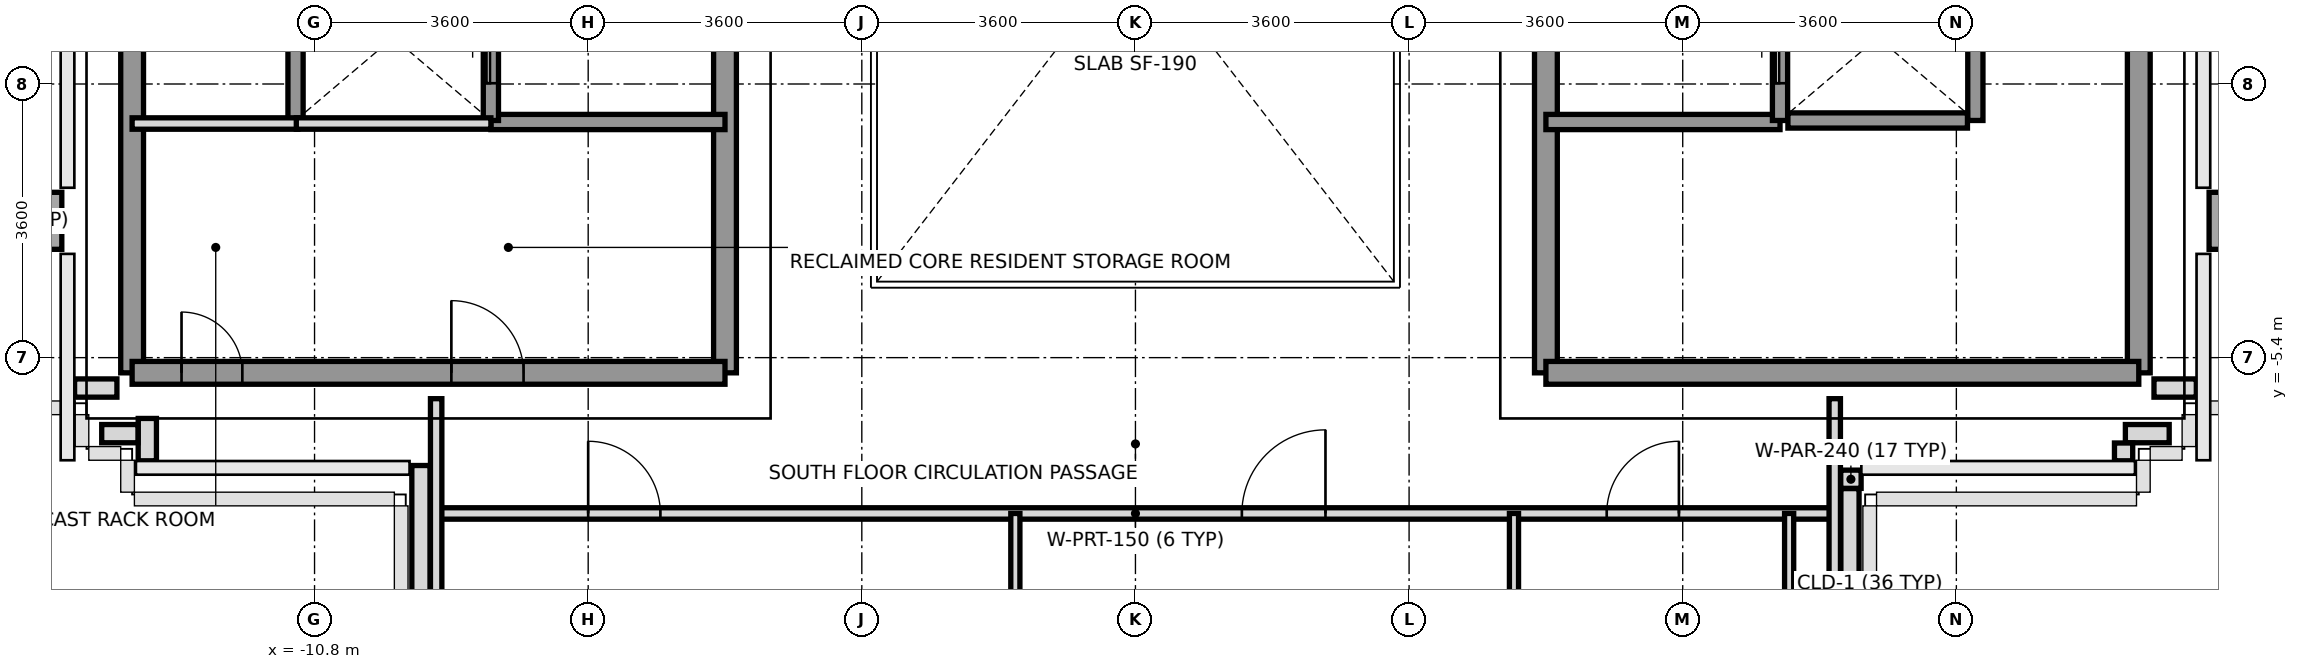
"""IFC4 building model, lengths in metres.
Left out: names, types, materials, properties, quantities, classifications, styles, units other than length and angle.
Written with IfcOpenShell. Run it as: python <this file> out.ifc"""

import sys

from ifc_helpers import new_model, si_unit, direction, frame, frame_2d, origin, origin_2d, place, context, subcontext, project, spatial, rectangle, extrude, source, transform, mapped, element, fill, save


model = new_model("IFC4")
c1 = context("Model", 3, precision=1e-05, world=origin(), true_north=direction((0.0, 1.0)))
c2 = subcontext(c1, "Body", "Model", "MODEL_VIEW")
j1 = project(units=[si_unit("LENGTHUNIT", "METRE"), si_unit("PLANEANGLEUNIT", "RADIAN")], contexts=[c1])
p1 = place(None, origin())
s1 = spatial("IfcSite", under=j1, at=p1, CompositionType="ELEMENT")
p2 = place(p1, origin())
s2 = spatial("IfcBuilding", under=s1, at=p2, CompositionType="ELEMENT")
p3 = place(p2, frame((0.0, 0.0, 268.4)))
s3 = spatial("IfcBuildingStorey", under=s2, at=p3, CompositionType="ELEMENT", Elevation=268.4)
m1 = source(origin(), c2, "Body", "SweptSolid", [
    extrude(rectangle(XDim=0.55, YDim=0.75, at=origin_2d()), origin(), (0.0, 0.0, 1.0), 2.96),
])
for number, where, z_axis, x_axis in (
    (1, (-14.4, -3.6, 0.0), (0.0, 0.0, 1.0), (1.0, 0.0, 0.0)),
    (2, (14.4, -3.6, 0.0), (0.0, 0.0, 1.0), (1.0, 0.0, 0.0)),
):
    element("IfcColumn", number, at=place(p3, frame(where, z_axis=z_axis, x_axis=x_axis)), inside=s3, PredefinedType="COLUMN", context=c2, shape_type="MappedRepresentation", body=[
        mapped(m1, transform((0.0, 0.0, 0.0), x_axis=(1.0, 0.0, 0.0), y_axis=(0.0, 1.0, 0.0), z_axis=(0.0, 0.0, 1.0), scale=1.0)),
    ])
p4 = place(p3, frame((13.957, -5.8, 0.0), z_axis=(0.0, 0.0, 1.0), x_axis=(-1.0, 0.0, 0.0)))
e3 = element("IfcWall", 3, at=p4, inside=s3, PredefinedType="PARAPET", context=c2, shape_type="SweptSolid", body=[
    extrude(rectangle(XDim=0.557, YDim=0.24, at=frame_2d((0.279, 0.0))), origin(), (0.0, 0.0, 1.0), 1.15),
])
p5 = place(p3, frame((13.6, -6.4, 0.0), z_axis=(0.0, 0.0, 1.0), x_axis=(-1.0, 0.0, 0.0)))
e4 = element("IfcWall", 4, at=p5, inside=s3, PredefinedType="PARAPET", context=c2, shape_type="SweptSolid", body=[
    extrude(rectangle(XDim=0.576, YDim=0.24, at=frame_2d((0.288, 0.0))), origin(), (0.0, 0.0, 1.0), 1.15),
])
p6 = place(p3, frame((13.0, -6.523, 0.0), z_axis=(0.0, 0.0, 1.0), x_axis=(0.0, -1.0, 0.0)))
e5 = element("IfcWall", 5, at=p6, inside=s3, PredefinedType="PARAPET", context=c2, shape_type="SweptSolid", body=[
    extrude(rectangle(XDim=0.234, YDim=0.24, at=frame_2d((0.117, 0.0))), origin(), (0.0, 0.0, 1.0), 1.15),
])
p7 = place(p3, frame((9.547, -7.0, 0.0), z_axis=(0.0, 0.0, 1.0), x_axis=(-1.0, 0.0, 0.0)))
e6 = element("IfcWall", 6, at=p7, inside=s3, PredefinedType="PARAPET", context=c2, shape_type="SweptSolid", body=[
    extrude(rectangle(XDim=0.269, YDim=0.24, at=frame_2d((0.135, 0.0))), origin(), (0.0, 0.0, 1.0), 1.15),
])
p8 = place(p3, frame((9.4, -7.123, 0.0), z_axis=(0.0, 0.0, 1.0), x_axis=(0.0, -1.0, 0.0)))
e7 = element("IfcWall", 7, at=p8, inside=s3, PredefinedType="PARAPET", context=c2, shape_type="SweptSolid", body=[
    extrude(rectangle(XDim=1.499, YDim=0.24, at=frame_2d((0.75, 0.0))), origin(), (0.0, 0.0, 1.0), 1.15),
])
p9 = place(p3, frame((-9.4, -8.622, 0.0), z_axis=(0.0, 0.0, 1.0), x_axis=(0.0, 1.0, 0.0)))
e8 = element("IfcWall", 8, at=p9, inside=s3, PredefinedType="PARAPET", context=c2, shape_type="SweptSolid", body=[
    extrude(rectangle(XDim=1.803, YDim=0.24, at=frame_2d((0.901, 0.0))), origin(), (0.0, 0.0, 1.0), 1.15),
])
p10 = place(p3, frame((-13.0, -6.757, 0.0), z_axis=(0.0, 0.0, 1.0), x_axis=(0.0, 1.0, 0.0)))
e9 = element("IfcWall", 9, at=p10, inside=s3, PredefinedType="PARAPET", context=c2, shape_type="SweptSolid", body=[
    extrude(rectangle(XDim=0.557, YDim=0.24, at=frame_2d((0.279, 0.0))), origin(), (0.0, 0.0, 1.0), 1.15),
])
p11 = place(p3, frame((-13.123, -6.4, 0.0), z_axis=(0.0, 0.0, 1.0), x_axis=(-1.0, 0.0, 0.0)))
e10 = element("IfcWall", 10, at=p11, inside=s3, PredefinedType="PARAPET", context=c2, shape_type="SweptSolid", body=[
    extrude(rectangle(XDim=0.477, YDim=0.24, at=frame_2d((0.239, 0.0))), origin(), (0.0, 0.0, 1.0), 1.15),
])
p12 = place(p3, frame((-13.4, -5.8, 0.0), z_axis=(0.0, 0.0, 1.0), x_axis=(-1.0, 0.0, 0.0)))
e11 = element("IfcWall", 11, at=p12, inside=s3, PredefinedType="PARAPET", context=c2, shape_type="SweptSolid", body=[
    extrude(rectangle(XDim=0.557, YDim=0.24, at=frame_2d((0.279, 0.0))), origin(), (0.0, 0.0, 1.0), 1.15),
])
p13 = place(p3, frame((-13.2, -5.6, 0.0), z_axis=(0.0, 0.0, 1.0), x_axis=(0.0, 1.0, 0.0)))
e12 = element("IfcWall", 12, at=p13, inside=s3, PredefinedType="SHEAR", context=c2, shape_type="SweptSolid", body=[
    extrude(rectangle(XDim=11.2, YDim=0.3, at=frame_2d((5.6, 0.0))), origin(), (0.0, 0.0, 1.0), 2.96),
])
p14 = place(p3, frame((-5.4, -5.6, 0.0), z_axis=(0.0, 0.0, 1.0), x_axis=(0.0, 1.0, 0.0)))
e13 = element("IfcWall", 13, at=p14, inside=s3, PredefinedType="SHEAR", context=c2, shape_type="SweptSolid", body=[
    extrude(rectangle(XDim=12.5, YDim=0.3, at=frame_2d((6.25, 0.0))), origin(), (0.0, 0.0, 1.0), 2.96),
])
p15 = place(p14, frame((4.55, 0.0, 0.0)))
e14 = element("IfcOpeningElement", 14, at=p15, cuts=e13, PredefinedType="OPENING", context=c2, shape_type="SweptSolid", body=[
    extrude(rectangle(XDim=1.2, YDim=2.2, at=frame_2d((0.6, 1.1))), frame((0.0, 0.16, 0.0), z_axis=(0.0, -1.0, 0.0), x_axis=(1.0, 0.0, 0.0)), (0.0, 0.0, 1.0), 0.32),
])
p16 = place(p14, frame((10.45, 0.0, 0.0)))
e15 = element("IfcOpeningElement", 15, at=p16, cuts=e13, PredefinedType="OPENING", context=c2, shape_type="SweptSolid", body=[
    extrude(rectangle(XDim=1.2, YDim=2.2, at=frame_2d((0.6, 1.1))), frame((0.0, 0.16, 0.0), z_axis=(0.0, -1.0, 0.0), x_axis=(1.0, 0.0, 0.0)), (0.0, 0.0, 1.0), 0.32),
])
p17 = place(p14, frame((6.86, 0.0, 0.0)))
e16 = element("IfcOpeningElement", 16, at=p17, cuts=e13, PredefinedType="OPENING", context=c2, shape_type="SweptSolid", body=[
    extrude(rectangle(XDim=0.8, YDim=2.1, at=frame_2d((0.4, 1.05))), frame((0.0, 0.16, 0.0), z_axis=(0.0, -1.0, 0.0), x_axis=(1.0, 0.0, 0.0)), (0.0, 0.0, 1.0), 0.32),
])
p18 = place(p3, frame((-13.2, -5.6, 0.0), z_axis=(0.0, 0.0, 1.0), x_axis=(1.0, 0.0, 0.0)))
e17 = element("IfcWall", 17, at=p18, inside=s3, PredefinedType="SHEAR", context=c2, shape_type="SweptSolid", body=[
    extrude(rectangle(XDim=7.8, YDim=0.3, at=frame_2d((3.9, 0.0))), origin(), (0.0, 0.0, 1.0), 2.96),
])
p19 = place(p18, frame((0.65, 0.0, 0.0)))
e18 = element("IfcOpeningElement", 18, at=p19, cuts=e17, PredefinedType="OPENING", context=c2, shape_type="SweptSolid", body=[
    extrude(rectangle(XDim=0.8, YDim=2.1, at=frame_2d((0.4, 1.05))), frame((0.0, 0.16, 0.0), z_axis=(0.0, -1.0, 0.0), x_axis=(1.0, 0.0, 0.0)), (0.0, 0.0, 1.0), 0.32),
])
p20 = place(p18, frame((4.2, 0.0, 0.0)))
e19 = element("IfcOpeningElement", 19, at=p20, cuts=e17, PredefinedType="OPENING", context=c2, shape_type="SweptSolid", body=[
    extrude(rectangle(XDim=0.95, YDim=2.15, at=frame_2d((0.475, 1.075))), frame((0.0, 0.16, 0.0), z_axis=(0.0, -1.0, 0.0), x_axis=(1.0, 0.0, 0.0)), (0.0, 0.0, 1.0), 0.32),
])
p21 = place(p3, frame((-8.48, -2.3, 0.0), z_axis=(0.0, 0.0, 1.0), x_axis=(1.0, 0.0, 0.0)))
e20 = element("IfcWall", 20, at=p21, inside=s3, PredefinedType="SOLIDWALL", context=c2, shape_type="SweptSolid", body=[
    extrude(rectangle(XDim=3.08, YDim=0.2, at=frame_2d((1.54, 0.0))), origin(), (0.0, 0.0, 1.0), 2.96),
])
p22 = place(p3, frame((13.2, -5.6, 0.0), z_axis=(0.0, 0.0, 1.0), x_axis=(0.0, 1.0, 0.0)))
e21 = element("IfcWall", 21, at=p22, inside=s3, PredefinedType="SHEAR", context=c2, shape_type="SweptSolid", body=[
    extrude(rectangle(XDim=11.2, YDim=0.3, at=frame_2d((5.6, 0.0))), origin(), (0.0, 0.0, 1.0), 2.96),
])
p23 = place(p3, frame((5.4, -5.6, 0.0), z_axis=(0.0, 0.0, 1.0), x_axis=(0.0, 1.0, 0.0)))
e22 = element("IfcWall", 22, at=p23, inside=s3, PredefinedType="SHEAR", context=c2, shape_type="SweptSolid", body=[
    extrude(rectangle(XDim=12.5, YDim=0.3, at=frame_2d((6.25, 0.0))), origin(), (0.0, 0.0, 1.0), 2.96),
])
p24 = place(p23, frame((4.55, 0.0, 0.0)))
e23 = element("IfcOpeningElement", 23, at=p24, cuts=e22, PredefinedType="OPENING", context=c2, shape_type="SweptSolid", body=[
    extrude(rectangle(XDim=1.2, YDim=2.2, at=frame_2d((0.6, 1.1))), frame((0.0, 0.16, 0.0), z_axis=(0.0, -1.0, 0.0), x_axis=(1.0, 0.0, 0.0)), (0.0, 0.0, 1.0), 0.32),
])
p25 = place(p23, frame((10.45, 0.0, 0.0)))
e24 = element("IfcOpeningElement", 24, at=p25, cuts=e22, PredefinedType="OPENING", context=c2, shape_type="SweptSolid", body=[
    extrude(rectangle(XDim=1.2, YDim=2.2, at=frame_2d((0.6, 1.1))), frame((0.0, 0.16, 0.0), z_axis=(0.0, -1.0, 0.0), x_axis=(1.0, 0.0, 0.0)), (0.0, 0.0, 1.0), 0.32),
])
p26 = place(p23, frame((6.86, 0.0, 0.0)))
e25 = element("IfcOpeningElement", 25, at=p26, cuts=e22, PredefinedType="OPENING", context=c2, shape_type="SweptSolid", body=[
    extrude(rectangle(XDim=0.8, YDim=2.1, at=frame_2d((0.4, 1.05))), frame((0.0, 0.16, 0.0), z_axis=(0.0, -1.0, 0.0), x_axis=(1.0, 0.0, 0.0)), (0.0, 0.0, 1.0), 0.32),
])
p27 = place(p3, frame((5.4, -5.6, 0.0), z_axis=(0.0, 0.0, 1.0), x_axis=(1.0, 0.0, 0.0)))
e26 = element("IfcWall", 26, at=p27, inside=s3, PredefinedType="SHEAR", context=c2, shape_type="SweptSolid", body=[
    extrude(rectangle(XDim=7.8, YDim=0.3, at=frame_2d((3.9, 0.0))), origin(), (0.0, 0.0, 1.0), 2.96),
])
p28 = place(p3, frame((5.4, -2.3, 0.0), z_axis=(0.0, 0.0, 1.0), x_axis=(1.0, 0.0, 0.0)))
e27 = element("IfcWall", 27, at=p28, inside=s3, PredefinedType="SOLIDWALL", context=c2, shape_type="SweptSolid", body=[
    extrude(rectangle(XDim=3.08, YDim=0.2, at=frame_2d((1.54, 0.0))), origin(), (0.0, 0.0, 1.0), 2.96),
])
p29 = place(p3, frame((-11.05, -2.28, 0.0), z_axis=(0.0, 0.0, 1.0), x_axis=(0.0, 1.0, 0.0)))
e28 = element("IfcWall", 28, at=p29, inside=s3, PredefinedType="SOLIDWALL", context=c2, shape_type="SweptSolid", body=[
    extrude(rectangle(XDim=2.18, YDim=0.2, at=frame_2d((1.09, 0.0))), origin(), (0.0, 0.0, 1.0), 2.96),
])
p30 = place(p3, frame((-8.48, -2.28, 0.0), z_axis=(0.0, 0.0, 1.0), x_axis=(0.0, 1.0, 0.0)))
e29 = element("IfcWall", 29, at=p30, inside=s3, PredefinedType="SOLIDWALL", context=c2, shape_type="SweptSolid", body=[
    extrude(rectangle(XDim=2.18, YDim=0.2, at=frame_2d((1.09, 0.0))), origin(), (0.0, 0.0, 1.0), 2.96),
])
p31 = place(p30, frame((0.49, 0.0, 0.0)))
e30 = element("IfcOpeningElement", 30, at=p31, cuts=e29, PredefinedType="OPENING", context=c2, shape_type="SweptSolid", body=[
    extrude(rectangle(XDim=1.2, YDim=2.2, at=frame_2d((0.6, 1.1))), frame((0.0, 0.11, 0.0), z_axis=(0.0, -1.0, 0.0), x_axis=(1.0, 0.0, 0.0)), (0.0, 0.0, 1.0), 0.22),
])
p32 = place(p3, frame((8.48, -2.28, 0.0), z_axis=(0.0, 0.0, 1.0), x_axis=(0.0, 1.0, 0.0)))
e31 = element("IfcWall", 31, at=p32, inside=s3, PredefinedType="SOLIDWALL", context=c2, shape_type="SweptSolid", body=[
    extrude(rectangle(XDim=2.18, YDim=0.2, at=frame_2d((1.09, 0.0))), origin(), (0.0, 0.0, 1.0), 2.96),
])
p33 = place(p32, frame((0.49, 0.0, 0.0)))
e32 = element("IfcOpeningElement", 32, at=p33, cuts=e31, PredefinedType="OPENING", context=c2, shape_type="SweptSolid", body=[
    extrude(rectangle(XDim=1.2, YDim=2.2, at=frame_2d((0.6, 1.1))), frame((0.0, 0.11, 0.0), z_axis=(0.0, -1.0, 0.0), x_axis=(1.0, 0.0, 0.0)), (0.0, 0.0, 1.0), 0.22),
])
p34 = place(p3, frame((11.05, -2.28, 0.0), z_axis=(0.0, 0.0, 1.0), x_axis=(0.0, 1.0, 0.0)))
e33 = element("IfcWall", 33, at=p34, inside=s3, PredefinedType="SOLIDWALL", context=c2, shape_type="SweptSolid", body=[
    extrude(rectangle(XDim=2.18, YDim=0.2, at=frame_2d((1.09, 0.0))), origin(), (0.0, 0.0, 1.0), 2.96),
])
p35 = place(p3, frame((8.584, -2.28, 0.0), z_axis=(0.0, 0.0, 1.0), x_axis=(1.0, 0.0, 0.0)))
e34 = element("IfcWall", 34, at=p35, inside=s3, PredefinedType="SOLIDWALL", context=c2, shape_type="SweptSolid", body=[
    extrude(rectangle(XDim=2.362, YDim=0.2, at=frame_2d((1.181, 0.0))), origin(), (0.0, 0.0, 1.0), 2.96),
])
p36 = place(p3, frame((-13.2, -2.32, 0.0), z_axis=(0.0, 0.0, 1.0), x_axis=(1.0, 0.0, 0.0)))
e35 = element("IfcWall", 35, at=p36, inside=s3, PredefinedType="PARTITIONING", context=c2, shape_type="SweptSolid", body=[
    extrude(rectangle(XDim=2.18, YDim=0.15, at=frame_2d((1.09, 0.0))), origin(), (0.0, 0.0, 1.0), 2.96),
])
p37 = place(p3, frame((-11.04, -2.32, 0.0), z_axis=(0.0, 0.0, 1.0), x_axis=(1.0, 0.0, 0.0)))
e36 = element("IfcWall", 36, at=p37, inside=s3, PredefinedType="PARTITIONING", context=c2, shape_type="SweptSolid", body=[
    extrude(rectangle(XDim=2.56, YDim=0.15, at=frame_2d((1.28, 0.0))), origin(), (0.0, 0.0, 1.0), 2.96),
])
p38 = place(p3, frame((-9.2, -7.45, 0.0), z_axis=(0.0, 0.0, 1.0), x_axis=(1.0, 0.0, 0.0)))
e37 = element("IfcWall", 37, at=p38, inside=s3, PredefinedType="PARTITIONING", context=c2, shape_type="SweptSolid", body=[
    extrude(rectangle(XDim=18.4, YDim=0.15, at=frame_2d((9.2, 0.0))), origin(), (0.0, 0.0, 1.0), 2.52),
])
p39 = place(p38, frame((15.4, 0.0, 0.0)))
e38 = element("IfcOpeningElement", 38, at=p39, cuts=e37, PredefinedType="OPENING", context=c2, shape_type="SweptSolid", body=[
    extrude(rectangle(XDim=0.95, YDim=2.15, at=frame_2d((0.475, 1.075))), frame((0.0, 0.085, 0.0), z_axis=(0.0, -1.0, 0.0), x_axis=(1.0, 0.0, 0.0)), (0.0, 0.0, 1.0), 0.17),
])
p40 = place(p38, frame((2.0, 0.0, 0.0)))
e39 = element("IfcOpeningElement", 39, at=p40, cuts=e37, PredefinedType="OPENING", context=c2, shape_type="SweptSolid", body=[
    extrude(rectangle(XDim=0.95, YDim=2.15, at=frame_2d((0.475, 1.075))), frame((0.0, 0.085, 0.0), z_axis=(0.0, -1.0, 0.0), x_axis=(1.0, 0.0, 0.0)), (0.0, 0.0, 1.0), 0.17),
])
p41 = place(p38, frame((10.6, 0.0, 0.0)))
e40 = element("IfcOpeningElement", 40, at=p41, cuts=e37, PredefinedType="OPENING", context=c2, shape_type="SweptSolid", body=[
    extrude(rectangle(XDim=1.1, YDim=2.2, at=frame_2d((0.55, 1.1))), frame((0.0, 0.085, 0.0), z_axis=(0.0, -1.0, 0.0), x_axis=(1.0, 0.0, 0.0)), (0.0, 0.0, 1.0), 0.17),
])
for number, where, z_axis, x_axis in (
    (41, (-9.2, -10.28, 0.0), (0.0, 0.0, 1.0), (0.0, 1.0, 0.0)),
    (42, (9.2, -10.28, 0.0), (0.0, 0.0, 1.0), (0.0, 1.0, 0.0)),
):
    element("IfcWall", number, at=place(p3, frame(where, z_axis=z_axis, x_axis=x_axis)), inside=s3, PredefinedType="PARTITIONING", context=c2, shape_type="SweptSolid", body=[
        extrude(rectangle(XDim=4.34, YDim=0.15, at=frame_2d((2.17, 0.0))), origin(), (0.0, 0.0, 1.0), 2.56),
    ])
for number, where, z_axis, x_axis in (
    (43, (4.98, -10.95, 0.0), (0.0, 0.0, 1.0), (0.0, 1.0, 0.0)),
    (44, (8.6, -10.95, 0.0), (0.0, 0.0, 1.0), (0.0, 1.0, 0.0)),
):
    element("IfcWall", number, at=place(p3, frame(where, z_axis=z_axis, x_axis=x_axis)), inside=s3, PredefinedType="PARTITIONING", context=c2, shape_type="SweptSolid", body=[
        extrude(rectangle(XDim=3.5, YDim=0.12, at=frame_2d((1.75, 0.0))), origin(), (0.0, 0.0, 1.0), 2.56),
    ])
p42 = place(p3, frame((-1.58, -19.25, 0.0), z_axis=(0.0, 0.0, 1.0), x_axis=(0.0, 1.0, 0.0)))
e45 = element("IfcWall", 45, at=p42, inside=s3, PredefinedType="PARTITIONING", context=c2, shape_type="SweptSolid", body=[
    extrude(rectangle(XDim=11.8, YDim=0.12, at=frame_2d((5.9, 0.0))), origin(), (0.0, 0.0, 1.0), 2.56),
])
m2 = source(origin(), c2, "Body", "SweptSolid", [
    extrude(rectangle(XDim=0.8, YDim=2.1, at=frame_2d((0.4, 1.05))), frame((0.0, 0.025, 0.0), z_axis=(0.0, -1.0, 0.0), x_axis=(1.0, 0.0, 0.0)), (0.0, 0.0, 1.0), 0.05),
])
p43 = place(p19, origin())
e46 = element("IfcDoor", 46, at=p43, inside=s3, OperationType="SINGLE_SWING_LEFT", PredefinedType="DOOR", context=c2, shape_type="MappedRepresentation", body=[
    mapped(m2, transform((0.0, 0.0, 0.0), x_axis=(1.0, 0.0, 0.0), y_axis=(0.0, 1.0, 0.0), z_axis=(0.0, 0.0, 1.0), scale=1.0)),
])
fill(e18, e46)
m3 = source(origin(), c2, "Body", "SweptSolid", [
    extrude(rectangle(XDim=0.95, YDim=2.15, at=frame_2d((0.475, 1.075))), frame((0.0, 0.025, 0.0), z_axis=(0.0, -1.0, 0.0), x_axis=(1.0, 0.0, 0.0)), (0.0, 0.0, 1.0), 0.05),
])
p44 = place(p20, origin())
e47 = element("IfcDoor", 47, at=p44, inside=s3, OperationType="SINGLE_SWING_LEFT", PredefinedType="DOOR", context=c2, shape_type="MappedRepresentation", body=[
    mapped(m3, transform((0.0, 0.0, 0.0), x_axis=(1.0, 0.0, 0.0), y_axis=(0.0, 1.0, 0.0), z_axis=(0.0, 0.0, 1.0), scale=1.0)),
])
fill(e19, e47)
m4 = source(origin(), c2, "Body", "SweptSolid", [
    extrude(rectangle(XDim=1.2, YDim=2.2, at=frame_2d((0.6, 1.1))), frame((0.0, 0.025, 0.0), z_axis=(0.0, -1.0, 0.0), x_axis=(1.0, 0.0, 0.0)), (0.0, 0.0, 1.0), 0.05),
])
p45 = place(p31, origin())
e48 = element("IfcDoor", 48, at=p45, inside=s3, OperationType="SLIDING_TO_RIGHT", PredefinedType="DOOR", context=c2, shape_type="MappedRepresentation", body=[
    mapped(m4, transform((0.0, 0.0, 0.0), x_axis=(1.0, 0.0, 0.0), y_axis=(0.0, 1.0, 0.0), z_axis=(0.0, 0.0, 1.0), scale=1.0)),
])
fill(e30, e48)
p46 = place(p33, origin())
e49 = element("IfcDoor", 49, at=p46, inside=s3, OperationType="SLIDING_TO_RIGHT", PredefinedType="DOOR", context=c2, shape_type="MappedRepresentation", body=[
    mapped(m4, transform((0.0, 0.0, 0.0), x_axis=(1.0, 0.0, 0.0), y_axis=(0.0, 1.0, 0.0), z_axis=(0.0, 0.0, 1.0), scale=1.0)),
])
fill(e32, e49)
p47 = place(p39, origin())
e50 = element("IfcDoor", 50, at=p47, inside=s3, OperationType="SINGLE_SWING_RIGHT", PredefinedType="DOOR", context=c2, shape_type="MappedRepresentation", body=[
    mapped(m3, transform((0.0, 0.0, 0.0), x_axis=(1.0, 0.0, 0.0), y_axis=(0.0, 1.0, 0.0), z_axis=(0.0, 0.0, 1.0), scale=1.0)),
])
fill(e38, e50)
p48 = place(p40, origin())
e51 = element("IfcDoor", 51, at=p48, inside=s3, OperationType="SINGLE_SWING_LEFT", PredefinedType="DOOR", context=c2, shape_type="MappedRepresentation", body=[
    mapped(m3, transform((0.0, 0.0, 0.0), x_axis=(1.0, 0.0, 0.0), y_axis=(0.0, 1.0, 0.0), z_axis=(0.0, 0.0, 1.0), scale=1.0)),
])
fill(e39, e51)
m5 = source(origin(), c2, "Body", "SweptSolid", [
    extrude(rectangle(XDim=1.1, YDim=2.2, at=frame_2d((0.55, 1.1))), frame((0.0, 0.025, 0.0), z_axis=(0.0, -1.0, 0.0), x_axis=(1.0, 0.0, 0.0)), (0.0, 0.0, 1.0), 0.05),
])
p49 = place(p41, origin())
e52 = element("IfcDoor", 52, at=p49, inside=s3, OperationType="SINGLE_SWING_RIGHT", PredefinedType="DOOR", context=c2, shape_type="MappedRepresentation", body=[
    mapped(m5, transform((0.0, 0.0, 0.0), x_axis=(1.0, 0.0, 0.0), y_axis=(0.0, 1.0, 0.0), z_axis=(0.0, 0.0, 1.0), scale=1.0)),
])
fill(e40, e52)
save(model, sys.argv[1])
